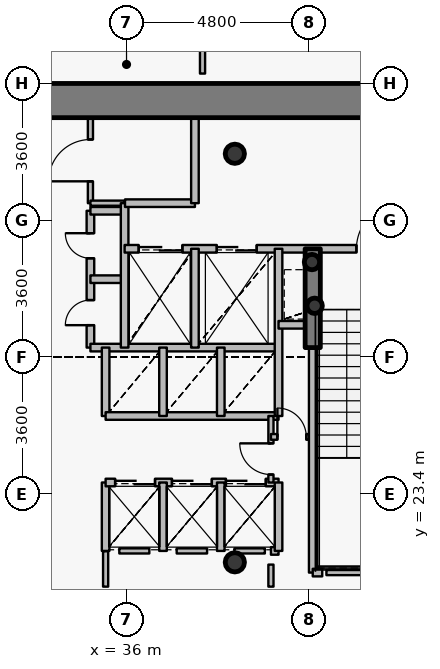
"""IFC4 building model, lengths in metres.
Left out: names, types, materials, properties, quantities, classifications, styles, units other than length and angle.
Written with IfcOpenShell. Run it as: python <this file> out.ifc"""

import sys

from ifc_helpers import new_model, si_unit, direction, frame, frame_2d, origin, origin_2d, place, context, subcontext, project, spatial, rectangle, hollow_circle, extrude, source, transform, mapped, element, fill, save


model = new_model("IFC4")
c1 = context("Model", 3, precision=1e-05, world=origin(), true_north=direction((0.0, 1.0)))
c2 = subcontext(c1, "Body", "Model", "MODEL_VIEW")
j1 = project(units=[si_unit("LENGTHUNIT", "METRE"), si_unit("PLANEANGLEUNIT", "RADIAN")], contexts=[c1])
p1 = place(None, origin())
s1 = spatial("IfcSite", under=j1, at=p1, CompositionType="ELEMENT")
p2 = place(p1, origin())
s2 = spatial("IfcBuilding", under=s1, at=p2, CompositionType="ELEMENT")
p3 = place(p2, frame((0.0, 0.0, 32.4)))
s3 = spatial("IfcBuildingStorey", under=s2, at=p3, CompositionType="ELEMENT", Elevation=32.4)
for number, where, z_axis, x_axis in (
    (1, (38.85, 21.6, 0.0), (0.0, 0.0, 1.0), (1.0, 0.0, 0.0)),
    (2, (38.85, 32.35, 0.0), (0.0, 0.0, 1.0), (1.0, 0.0, 0.0)),
):
    element("IfcColumn", number, at=place(p3, frame(where, z_axis=z_axis, x_axis=x_axis)), inside=s3, PredefinedType="COLUMN", context=c2, shape_type="SweptSolid", body=[
        extrude(hollow_circle(Radius=0.254, WallThickness=0.02, at=origin_2d()), origin(), (0.0, 0.0, 1.0), 4.2),
    ])
for number, where, z_axis, x_axis in (
    (3, (40.95, 28.35, 0.0), (0.0, 0.0, 1.0), (1.0, 0.0, 0.0)),
    (4, (40.88, 29.5, 0.0), (0.0, 0.0, 1.0), (1.0, 0.0, 0.0)),
):
    element("IfcColumn", number, at=place(p3, frame(where, z_axis=z_axis, x_axis=x_axis)), inside=s3, PredefinedType="COLUMN", context=c2, shape_type="SweptSolid", body=[
        extrude(hollow_circle(Radius=0.203, WallThickness=0.016, at=origin_2d()), origin(), (0.0, 0.0, 1.0), 4.2),
    ])
p4 = place(p3, frame((26.75, 33.75, 0.0), z_axis=(0.0, 0.0, 1.0), x_axis=(1.0, 0.0, 0.0)))
e5 = element("IfcWall", 5, at=p4, inside=s3, PredefinedType="SHEAR", context=c2, shape_type="SweptSolid", body=[
    extrude(rectangle(XDim=18.5, YDim=0.9, at=frame_2d((9.25, 0.0))), origin(), (0.0, 0.0, 1.0), 3.4),
])
p5 = place(p3, frame((40.9, 27.25, 0.0), z_axis=(0.0, 0.0, 1.0), x_axis=(0.0, 1.0, 0.0)))
e6 = element("IfcWall", 6, at=p5, inside=s3, PredefinedType="SHEAR", context=c2, shape_type="SweptSolid", body=[
    extrude(rectangle(XDim=2.6, YDim=0.4, at=frame_2d((1.3, 0.0))), origin(), (0.0, 0.0, 1.0), 3.55),
])
p6 = place(p3, frame((35.05, 27.25, 0.0), z_axis=(0.0, 0.0, 1.0), x_axis=(0.0, 1.0, 0.0)))
e7 = element("IfcWall", 7, at=p6, inside=s3, PredefinedType="PARTITIONING", context=c2, shape_type="SweptSolid", body=[
    extrude(rectangle(XDim=3.6, YDim=0.2, at=frame_2d((1.8, 0.0))), origin(), (0.0, 0.0, 1.0), 3.95),
])
p7 = place(p6, frame((0.59, 0.0, 0.0)))
e8 = element("IfcOpeningElement", 8, at=p7, cuts=e7, PredefinedType="OPENING", context=c2, shape_type="SweptSolid", body=[
    extrude(rectangle(XDim=0.66, YDim=2.05, at=origin_2d()), frame((0.33, 0.11, 1.025), z_axis=(0.0, -1.0, 0.0), x_axis=(1.0, 0.0, 0.0)), (0.0, 0.0, 1.0), 0.22),
])
p8 = place(p6, frame((2.35, 0.0, 0.0)))
e9 = element("IfcOpeningElement", 9, at=p8, cuts=e7, PredefinedType="OPENING", context=c2, shape_type="SweptSolid", body=[
    extrude(rectangle(XDim=0.66, YDim=2.05, at=origin_2d()), frame((0.33, 0.11, 1.025), z_axis=(0.0, -1.0, 0.0), x_axis=(1.0, 0.0, 0.0)), (0.0, 0.0, 1.0), 0.22),
])
p9 = place(p3, frame((35.05, 27.25, 0.0), z_axis=(0.0, 0.0, 1.0), x_axis=(1.0, 0.0, 0.0)))
e10 = element("IfcWall", 10, at=p9, inside=s3, PredefinedType="PARTITIONING", context=c2, shape_type="SweptSolid", body=[
    extrude(rectangle(XDim=4.95, YDim=0.2, at=frame_2d((2.475, 0.0))), origin(), (0.0, 0.0, 1.0), 3.535),
])
for number, where, z_axis, x_axis in (
    (11, (35.05, 29.05, 0.0), (0.0, 0.0, 1.0), (1.0, 0.0, 0.0)),
    (12, (35.05, 30.85, 0.0), (0.0, 0.0, 1.0), (1.0, 0.0, 0.0)),
):
    element("IfcWall", number, at=place(p3, frame(where, z_axis=z_axis, x_axis=x_axis)), inside=s3, PredefinedType="PARTITIONING", context=c2, shape_type="SweptSolid", body=[
        extrude(rectangle(XDim=0.9, YDim=0.2, at=frame_2d((0.45, 0.0))), origin(), (0.0, 0.0, 1.0), 3.95),
    ])
p10 = place(p3, frame((35.05, 31.05, 0.0), z_axis=(0.0, 0.0, 1.0), x_axis=(0.0, 1.0, 0.0)))
e13 = element("IfcWall", 13, at=p10, inside=s3, PredefinedType="PARTITIONING", context=c2, shape_type="SweptSolid", body=[
    extrude(rectangle(XDim=2.25, YDim=0.135, at=frame_2d((1.125, 0.0))), origin(), (0.0, 0.0, 1.0), 3.535),
])
p11 = place(p10, frame((0.575, 0.0, 0.0)))
e14 = element("IfcOpeningElement", 14, at=p11, cuts=e13, PredefinedType="OPENING", context=c2, shape_type="SweptSolid", body=[
    extrude(rectangle(XDim=1.1, YDim=2.15, at=origin_2d()), frame((0.55, 0.078, 1.075), z_axis=(0.0, -1.0, 0.0), x_axis=(1.0, 0.0, 0.0)), (0.0, 0.0, 1.0), 0.155),
])
p12 = place(p3, frame((35.05, 31.05, 0.0), z_axis=(0.0, 0.0, 1.0), x_axis=(1.0, 0.0, 0.0)))
e15 = element("IfcWall", 15, at=p12, inside=s3, PredefinedType="PARTITIONING", context=c2, shape_type="SweptSolid", body=[
    extrude(rectangle(XDim=0.9, YDim=0.135, at=frame_2d((0.45, 0.0))), origin(), (0.0, 0.0, 1.0), 3.95),
])
p13 = place(p3, frame((35.45, 21.9, 0.0), z_axis=(0.0, 0.0, 1.0), x_axis=(0.0, 1.0, 0.0)))
e16 = element("IfcWall", 16, at=p13, inside=s3, PredefinedType="PARTITIONING", context=c2, shape_type="SweptSolid", body=[
    extrude(rectangle(XDim=1.8, YDim=0.2, at=frame_2d((0.9, 0.0))), origin(), (0.0, 0.0, 1.0), 3.95),
])
p14 = place(p3, frame((35.45, 23.7, 0.0), z_axis=(0.0, 0.0, 1.0), x_axis=(1.0, 0.0, 0.0)))
e17 = element("IfcWall", 17, at=p14, inside=s3, PredefinedType="PARTITIONING", context=c2, shape_type="SweptSolid", body=[
    extrude(rectangle(XDim=4.55, YDim=0.2, at=frame_2d((2.275, 0.0))), origin(), (0.0, 0.0, 1.0), 3.535),
])
p15 = place(p14, frame((0.25, 0.0, 0.0)))
e18 = element("IfcOpeningElement", 18, at=p15, cuts=e17, PredefinedType="OPENING", context=c2, shape_type="SweptSolid", body=[
    extrude(rectangle(XDim=1.05, YDim=2.15, at=origin_2d()), frame((0.525, 0.11, 1.075), z_axis=(0.0, -1.0, 0.0), x_axis=(1.0, 0.0, 0.0)), (0.0, 0.0, 1.0), 0.22),
])
p16 = place(p14, frame((1.745, 0.0, 0.0)))
e19 = element("IfcOpeningElement", 19, at=p16, cuts=e17, PredefinedType="OPENING", context=c2, shape_type="SweptSolid", body=[
    extrude(rectangle(XDim=1.05, YDim=2.15, at=origin_2d()), frame((0.525, 0.11, 1.075), z_axis=(0.0, -1.0, 0.0), x_axis=(1.0, 0.0, 0.0)), (0.0, 0.0, 1.0), 0.22),
])
p17 = place(p14, frame((3.165, 0.0, 0.0)))
e20 = element("IfcOpeningElement", 20, at=p17, cuts=e17, PredefinedType="OPENING", context=c2, shape_type="SweptSolid", body=[
    extrude(rectangle(XDim=1.05, YDim=2.15, at=origin_2d()), frame((0.525, 0.11, 1.075), z_axis=(0.0, -1.0, 0.0), x_axis=(1.0, 0.0, 0.0)), (0.0, 0.0, 1.0), 0.22),
])
p18 = place(p3, frame((35.45, 25.45, 0.0), z_axis=(0.0, 0.0, 1.0), x_axis=(0.0, 1.0, 0.0)))
e21 = element("IfcWall", 21, at=p18, inside=s3, PredefinedType="PARTITIONING", context=c2, shape_type="SweptSolid", body=[
    extrude(rectangle(XDim=1.8, YDim=0.2, at=frame_2d((0.9, 0.0))), origin(), (0.0, 0.0, 1.0), 3.95),
])
p19 = place(p3, frame((35.45, 25.45, 0.0), z_axis=(0.0, 0.0, 1.0), x_axis=(1.0, 0.0, 0.0)))
e22 = element("IfcWall", 22, at=p19, inside=s3, PredefinedType="PARTITIONING", context=c2, shape_type="SweptSolid", body=[
    extrude(rectangle(XDim=4.55, YDim=0.2, at=frame_2d((2.275, 0.0))), origin(), (0.0, 0.0, 1.0), 3.535),
])
p20 = place(p3, frame((35.95, 27.25, 0.0), z_axis=(0.0, 0.0, 1.0), x_axis=(0.0, 1.0, 0.0)))
e23 = element("IfcWall", 23, at=p20, inside=s3, PredefinedType="PARTITIONING", context=c2, shape_type="SweptSolid", body=[
    extrude(rectangle(XDim=3.8, YDim=0.2, at=frame_2d((1.9, 0.0))), origin(), (0.0, 0.0, 1.0), 3.95),
])
p21 = place(p3, frame((35.95, 29.85, 0.0), z_axis=(0.0, 0.0, 1.0), x_axis=(1.0, 0.0, 0.0)))
e24 = element("IfcWall", 24, at=p21, inside=s3, PredefinedType="PARTITIONING", context=c2, shape_type="SweptSolid", body=[
    extrude(rectangle(XDim=8.49, YDim=0.2, at=frame_2d((4.245, 0.0))), origin(), (0.0, 0.0, 1.0), 3.535),
])
p22 = place(p21, frame((6.1, 0.0, 0.0)))
e25 = element("IfcOpeningElement", 25, at=p22, cuts=e24, PredefinedType="OPENING", context=c2, shape_type="SweptSolid", body=[
    extrude(rectangle(XDim=1.2, YDim=2.15, at=origin_2d()), frame((0.6, 0.11, 1.075), z_axis=(0.0, -1.0, 0.0), x_axis=(1.0, 0.0, 0.0)), (0.0, 0.0, 1.0), 0.22),
])
p23 = place(p21, frame((0.37, 0.0, 0.0)))
e26 = element("IfcOpeningElement", 26, at=p23, cuts=e24, PredefinedType="OPENING", context=c2, shape_type="SweptSolid", body=[
    extrude(rectangle(XDim=1.15, YDim=2.15, at=origin_2d()), frame((0.575, 0.11, 1.075), z_axis=(0.0, -1.0, 0.0), x_axis=(1.0, 0.0, 0.0)), (0.0, 0.0, 1.0), 0.22),
])
p24 = place(p21, frame((2.425, 0.0, 0.0)))
e27 = element("IfcOpeningElement", 27, at=p24, cuts=e24, PredefinedType="OPENING", context=c2, shape_type="SweptSolid", body=[
    extrude(rectangle(XDim=1.05, YDim=2.15, at=origin_2d()), frame((0.525, 0.11, 1.075), z_axis=(0.0, -1.0, 0.0), x_axis=(1.0, 0.0, 0.0)), (0.0, 0.0, 1.0), 0.22),
])
p25 = place(p3, frame((35.96, 31.05, 0.0), z_axis=(0.0, 0.0, 1.0), x_axis=(1.0, 0.0, 0.0)))
e28 = element("IfcWall", 28, at=p25, inside=s3, PredefinedType="PARTITIONING", context=c2, shape_type="SweptSolid", body=[
    extrude(rectangle(XDim=1.84, YDim=0.2, at=frame_2d((0.92, 0.0))), origin(), (0.0, 0.0, 1.0), 3.95),
])
for number, where, z_axis, x_axis in (
    (29, (36.96, 21.9, 0.0), (0.0, 0.0, 1.0), (0.0, 1.0, 0.0)),
    (30, (36.96, 25.45, 0.0), (0.0, 0.0, 1.0), (0.0, 1.0, 0.0)),
):
    element("IfcWall", number, at=place(p3, frame(where, z_axis=z_axis, x_axis=x_axis)), inside=s3, PredefinedType="PARTITIONING", context=c2, shape_type="SweptSolid", body=[
        extrude(rectangle(XDim=1.8, YDim=0.2, at=frame_2d((0.9, 0.0))), origin(), (0.0, 0.0, 1.0), 3.95),
    ])
p26 = place(p3, frame((37.8, 27.25, 0.0), z_axis=(0.0, 0.0, 1.0), x_axis=(0.0, 1.0, 0.0)))
e31 = element("IfcWall", 31, at=p26, inside=s3, PredefinedType="PARTITIONING", context=c2, shape_type="SweptSolid", body=[
    extrude(rectangle(XDim=2.6, YDim=0.2, at=frame_2d((1.3, 0.0))), origin(), (0.0, 0.0, 1.0), 3.95),
])
p27 = place(p3, frame((37.8, 31.05, 0.0), z_axis=(0.0, 0.0, 1.0), x_axis=(0.0, 1.0, 0.0)))
e32 = element("IfcWall", 32, at=p27, inside=s3, PredefinedType="PARTITIONING", context=c2, shape_type="SweptSolid", body=[
    extrude(rectangle(XDim=2.25, YDim=0.2, at=frame_2d((1.125, 0.0))), origin(), (0.0, 0.0, 1.0), 3.535),
])
for number, where, z_axis, x_axis in (
    (33, (38.48, 21.9, 0.0), (0.0, 0.0, 1.0), (0.0, 1.0, 0.0)),
    (34, (38.48, 25.45, 0.0), (0.0, 0.0, 1.0), (0.0, 1.0, 0.0)),
):
    element("IfcWall", number, at=place(p3, frame(where, z_axis=z_axis, x_axis=x_axis)), inside=s3, PredefinedType="PARTITIONING", context=c2, shape_type="SweptSolid", body=[
        extrude(rectangle(XDim=1.8, YDim=0.2, at=frame_2d((0.9, 0.0))), origin(), (0.0, 0.0, 1.0), 3.95),
    ])
p28 = place(p3, frame((39.8, 21.9, 0.0), z_axis=(0.0, 0.0, 1.0), x_axis=(1.0, 0.0, 0.0)))
e35 = element("IfcWall", 35, at=p28, inside=s3, PredefinedType="PARTITIONING", context=c2, shape_type="SweptSolid", body=[
    extrude(rectangle(XDim=0.2, YDim=0.2, at=frame_2d((0.1, 0.0))), origin(), (0.0, 0.0, 1.0), 3.95),
])
p29 = place(p3, frame((39.8, 23.7, 0.0), z_axis=(0.0, 0.0, 1.0), x_axis=(0.0, 1.0, 0.0)))
e36 = element("IfcWall", 36, at=p29, inside=s3, PredefinedType="PARTITIONING", context=c2, shape_type="SweptSolid", body=[
    extrude(rectangle(XDim=1.75, YDim=0.135, at=frame_2d((0.875, 0.0))), origin(), (0.0, 0.0, 1.0), 3.95),
])
p30 = place(p29, frame((0.21, 0.0, 0.0)))
e37 = element("IfcOpeningElement", 37, at=p30, cuts=e36, PredefinedType="OPENING", context=c2, shape_type="SweptSolid", body=[
    extrude(rectangle(XDim=0.82, YDim=2.1, at=origin_2d()), frame((0.41, 0.078, 1.05), z_axis=(0.0, -1.0, 0.0), x_axis=(1.0, 0.0, 0.0)), (0.0, 0.0, 1.0), 0.155),
])
p31 = place(p3, frame((39.8, 24.9, 0.0), z_axis=(0.0, 0.0, 1.0), x_axis=(1.0, 0.0, 0.0)))
e38 = element("IfcWall", 38, at=p31, inside=s3, PredefinedType="PARTITIONING", context=c2, shape_type="SweptSolid", body=[
    extrude(rectangle(XDim=1.1, YDim=0.15, at=frame_2d((0.55, 0.0))), origin(), (0.0, 0.0, 1.0), 3.95),
])
p32 = place(p31, frame((0.17, 0.0, 0.0)))
e39 = element("IfcOpeningElement", 39, at=p32, cuts=e38, PredefinedType="OPENING", context=c2, shape_type="SweptSolid", body=[
    extrude(rectangle(XDim=0.76, YDim=2.1, at=origin_2d()), frame((0.38, 0.085, 1.05), z_axis=(0.0, -1.0, 0.0), x_axis=(1.0, 0.0, 0.0)), (0.0, 0.0, 1.0), 0.17),
])
p33 = place(p3, frame((40.0, 21.9, 0.0), z_axis=(0.0, 0.0, 1.0), x_axis=(0.0, 1.0, 0.0)))
e40 = element("IfcWall", 40, at=p33, inside=s3, PredefinedType="PARTITIONING", context=c2, shape_type="SweptSolid", body=[
    extrude(rectangle(XDim=1.8, YDim=0.2, at=frame_2d((0.9, 0.0))), origin(), (0.0, 0.0, 1.0), 3.95),
])
p34 = place(p3, frame((40.0, 25.45, 0.0), z_axis=(0.0, 0.0, 1.0), x_axis=(0.0, 1.0, 0.0)))
e41 = element("IfcWall", 41, at=p34, inside=s3, PredefinedType="PARTITIONING", context=c2, shape_type="SweptSolid", body=[
    extrude(rectangle(XDim=4.4, YDim=0.2, at=frame_2d((2.2, 0.0))), origin(), (0.0, 0.0, 1.0), 3.95),
])
p35 = place(p3, frame((40.0, 27.85, 0.0), z_axis=(0.0, 0.0, 1.0), x_axis=(1.0, 0.0, 0.0)))
e42 = element("IfcWall", 42, at=p35, inside=s3, PredefinedType="PARTITIONING", context=c2, shape_type="SweptSolid", body=[
    extrude(rectangle(XDim=0.9, YDim=0.2, at=frame_2d((0.45, 0.0))), origin(), (0.0, 0.0, 1.0), 3.95),
])
p36 = place(p3, frame((40.9, 21.33, 0.0), z_axis=(0.0, 0.0, 1.0), x_axis=(0.0, 1.0, 0.0)))
e43 = element("IfcWall", 43, at=p36, inside=s3, PredefinedType="PARTITIONING", context=c2, shape_type="SweptSolid", body=[
    extrude(rectangle(XDim=5.91, YDim=0.2, at=frame_2d((2.955, 0.0))), origin(), (0.0, 0.0, 1.0), 3.485),
])
p37 = place(p3, frame((40.9, 21.33, 0.0), z_axis=(0.0, 0.0, 1.0), x_axis=(1.0, 0.0, 0.0)))
e44 = element("IfcWall", 44, at=p37, inside=s3, PredefinedType="PARTITIONING", context=c2, shape_type="SweptSolid", body=[
    extrude(rectangle(XDim=0.25, YDim=0.2, at=frame_2d((0.125, 0.0))), origin(), (0.0, 0.0, 1.0), 3.485),
])
p38 = place(p3, frame((44.08, 21.33, 0.0), z_axis=(0.0, 0.0, 1.0), x_axis=(-1.0, 0.0, 0.0)))
e45 = element("IfcWall", 45, at=p38, inside=s3, PredefinedType="PARTITIONING", context=c2, shape_type="SweptSolid", body=[
    extrude(rectangle(XDim=2.82, YDim=0.135, at=frame_2d((1.41, 0.0))), origin(), (0.0, 0.0, 1.0), 3.485),
])
p39 = place(p3, frame((36.6, 21.9, 0.0), z_axis=(0.0, 0.0, 1.0), x_axis=(-1.0, 0.0, 0.0)))
e46 = element("IfcWall", 46, at=p39, inside=s3, PredefinedType="PARTITIONING", context=c2, shape_type="SweptSolid", body=[
    extrude(rectangle(XDim=0.79, YDim=0.135, at=frame_2d((0.395, 0.0))), origin(), (0.0, 0.0, 1.0), 3.95),
])
p40 = place(p3, frame((38.12, 21.9, 0.0), z_axis=(0.0, 0.0, 1.0), x_axis=(-1.0, 0.0, 0.0)))
e47 = element("IfcWall", 47, at=p40, inside=s3, PredefinedType="PARTITIONING", context=c2, shape_type="SweptSolid", body=[
    extrude(rectangle(XDim=0.8, YDim=0.135, at=frame_2d((0.4, 0.0))), origin(), (0.0, 0.0, 1.0), 3.95),
])
p41 = place(p3, frame((39.64, 21.9, 0.0), z_axis=(0.0, 0.0, 1.0), x_axis=(-1.0, 0.0, 0.0)))
e48 = element("IfcWall", 48, at=p41, inside=s3, PredefinedType="PARTITIONING", context=c2, shape_type="SweptSolid", body=[
    extrude(rectangle(XDim=0.8, YDim=0.135, at=frame_2d((0.4, 0.0))), origin(), (0.0, 0.0, 1.0), 3.535),
])
p42 = place(p3, frame((39.8, 20.96, 0.0), z_axis=(0.0, 0.0, 1.0), x_axis=(0.0, 1.0, 0.0)))
e49 = element("IfcWall", 49, at=p42, inside=s3, PredefinedType="PARTITIONING", context=c2, shape_type="SweptSolid", body=[
    extrude(rectangle(XDim=0.58, YDim=0.135, at=frame_2d((0.29, 0.0))), origin(), (0.0, 0.0, 1.0), 3.485),
])
p43 = place(p3, frame((35.45, 21.89, 0.0), z_axis=(0.0, 0.0, 1.0), x_axis=(0.0, -1.0, 0.0)))
e50 = element("IfcWall", 50, at=p43, inside=s3, PredefinedType="PARTITIONING", context=c2, shape_type="SweptSolid", body=[
    extrude(rectangle(XDim=0.93, YDim=0.135, at=frame_2d((0.465, 0.0))), origin(), (0.0, 0.0, 1.0), 3.535),
])
p44 = place(p3, frame((38.0, 34.46, 0.0), z_axis=(0.0, 0.0, 1.0), x_axis=(0.0, 1.0, 0.0)))
e51 = element("IfcWall", 51, at=p44, inside=s3, PredefinedType="PARTITIONING", context=c2, shape_type="SweptSolid", body=[
    extrude(rectangle(XDim=1.64, YDim=0.135, at=frame_2d((0.82, 0.0))), origin(), (0.0, 0.0, 1.0), 3.95),
])
m1 = source(origin(), c2, "Body", "SweptSolid", [
    extrude(rectangle(XDim=1.2, YDim=2.15, at=origin_2d()), frame((0.6, 0.025, 1.075), z_axis=(0.0, -1.0, 0.0), x_axis=(1.0, 0.0, 0.0)), (0.0, 0.0, 1.0), 0.05),
])
p45 = place(p22, origin())
e52 = element("IfcDoor", 52, at=p45, inside=s3, OperationType="SINGLE_SWING_RIGHT", PredefinedType="DOOR", context=c2, shape_type="MappedRepresentation", body=[
    mapped(m1, transform((0.0, 0.0, 0.0), x_axis=(1.0, 0.0, 0.0), y_axis=(0.0, 1.0, 0.0), z_axis=(0.0, 0.0, 1.0), scale=1.0)),
])
fill(e25, e52)
m2 = source(origin(), c2, "Body", "SweptSolid", [
    extrude(rectangle(XDim=1.15, YDim=2.15, at=origin_2d()), frame((0.575, 0.025, 1.075), z_axis=(0.0, -1.0, 0.0), x_axis=(1.0, 0.0, 0.0)), (0.0, 0.0, 1.0), 0.05),
])
p46 = place(p23, origin())
e53 = element("IfcDoor", 53, at=p46, inside=s3, OperationType="DOUBLE_DOOR_SLIDING", PredefinedType="USERDEFINED", context=c2, shape_type="MappedRepresentation", body=[
    mapped(m2, transform((0.0, 0.0, 0.0), x_axis=(1.0, 0.0, 0.0), y_axis=(0.0, 1.0, 0.0), z_axis=(0.0, 0.0, 1.0), scale=1.0)),
])
fill(e26, e53)
m3 = source(origin(), c2, "Body", "SweptSolid", [
    extrude(rectangle(XDim=1.05, YDim=2.15, at=origin_2d()), frame((0.525, 0.025, 1.075), z_axis=(0.0, -1.0, 0.0), x_axis=(1.0, 0.0, 0.0)), (0.0, 0.0, 1.0), 0.05),
])
p47 = place(p24, origin())
e54 = element("IfcDoor", 54, at=p47, inside=s3, OperationType="DOUBLE_DOOR_SLIDING", PredefinedType="USERDEFINED", context=c2, shape_type="MappedRepresentation", body=[
    mapped(m3, transform((0.0, 0.0, 0.0), x_axis=(1.0, 0.0, 0.0), y_axis=(0.0, 1.0, 0.0), z_axis=(0.0, 0.0, 1.0), scale=1.0)),
])
fill(e27, e54)
p48 = place(p15, origin())
e55 = element("IfcDoor", 55, at=p48, inside=s3, OperationType="DOUBLE_DOOR_SLIDING", PredefinedType="USERDEFINED", context=c2, shape_type="MappedRepresentation", body=[
    mapped(m3, transform((0.0, 0.0, 0.0), x_axis=(1.0, 0.0, 0.0), y_axis=(0.0, 1.0, 0.0), z_axis=(0.0, 0.0, 1.0), scale=1.0)),
])
fill(e18, e55)
p49 = place(p16, origin())
e56 = element("IfcDoor", 56, at=p49, inside=s3, OperationType="DOUBLE_DOOR_SLIDING", PredefinedType="USERDEFINED", context=c2, shape_type="MappedRepresentation", body=[
    mapped(m3, transform((0.0, 0.0, 0.0), x_axis=(1.0, 0.0, 0.0), y_axis=(0.0, 1.0, 0.0), z_axis=(0.0, 0.0, 1.0), scale=1.0)),
])
fill(e19, e56)
p50 = place(p17, origin())
e57 = element("IfcDoor", 57, at=p50, inside=s3, OperationType="DOUBLE_DOOR_SLIDING", PredefinedType="USERDEFINED", context=c2, shape_type="MappedRepresentation", body=[
    mapped(m3, transform((0.0, 0.0, 0.0), x_axis=(1.0, 0.0, 0.0), y_axis=(0.0, 1.0, 0.0), z_axis=(0.0, 0.0, 1.0), scale=1.0)),
])
fill(e20, e57)
m4 = source(origin(), c2, "Body", "SweptSolid", [
    extrude(rectangle(XDim=0.66, YDim=2.05, at=origin_2d()), frame((0.33, 0.025, 1.025), z_axis=(0.0, -1.0, 0.0), x_axis=(1.0, 0.0, 0.0)), (0.0, 0.0, 1.0), 0.05),
])
p51 = place(p7, origin())
e58 = element("IfcDoor", 58, at=p51, inside=s3, OperationType="SINGLE_SWING_LEFT", PredefinedType="USERDEFINED", context=c2, shape_type="MappedRepresentation", body=[
    mapped(m4, transform((0.0, 0.0, 0.0), x_axis=(1.0, 0.0, 0.0), y_axis=(0.0, 1.0, 0.0), z_axis=(0.0, 0.0, 1.0), scale=1.0)),
])
fill(e8, e58)
p52 = place(p8, origin())
e59 = element("IfcDoor", 59, at=p52, inside=s3, OperationType="SINGLE_SWING_RIGHT", PredefinedType="USERDEFINED", context=c2, shape_type="MappedRepresentation", body=[
    mapped(m4, transform((0.0, 0.0, 0.0), x_axis=(1.0, 0.0, 0.0), y_axis=(0.0, 1.0, 0.0), z_axis=(0.0, 0.0, 1.0), scale=1.0)),
])
fill(e9, e59)
m5 = source(origin(), c2, "Body", "SweptSolid", [
    extrude(rectangle(XDim=1.1, YDim=2.15, at=origin_2d()), frame((0.55, 0.025, 1.075), z_axis=(0.0, -1.0, 0.0), x_axis=(1.0, 0.0, 0.0)), (0.0, 0.0, 1.0), 0.05),
])
p53 = place(p11, origin())
e60 = element("IfcDoor", 60, at=p53, inside=s3, OperationType="SINGLE_SWING_LEFT", PredefinedType="DOOR", context=c2, shape_type="MappedRepresentation", body=[
    mapped(m5, transform((0.0, 0.0, 0.0), x_axis=(1.0, 0.0, 0.0), y_axis=(0.0, 1.0, 0.0), z_axis=(0.0, 0.0, 1.0), scale=1.0)),
])
fill(e14, e60)
m6 = source(origin(), c2, "Body", "SweptSolid", [
    extrude(rectangle(XDim=0.82, YDim=2.1, at=origin_2d()), frame((0.41, 0.025, 1.05), z_axis=(0.0, -1.0, 0.0), x_axis=(1.0, 0.0, 0.0)), (0.0, 0.0, 1.0), 0.05),
])
p54 = place(p30, origin())
e61 = element("IfcDoor", 61, at=p54, inside=s3, OperationType="SINGLE_SWING_RIGHT", PredefinedType="DOOR", context=c2, shape_type="MappedRepresentation", body=[
    mapped(m6, transform((0.0, 0.0, 0.0), x_axis=(1.0, 0.0, 0.0), y_axis=(0.0, 1.0, 0.0), z_axis=(0.0, 0.0, 1.0), scale=1.0)),
])
fill(e37, e61)
m7 = source(origin(), c2, "Body", "SweptSolid", [
    extrude(rectangle(XDim=0.76, YDim=2.1, at=origin_2d()), frame((0.38, 0.025, 1.05), z_axis=(0.0, -1.0, 0.0), x_axis=(1.0, 0.0, 0.0)), (0.0, 0.0, 1.0), 0.05),
])
p55 = place(p32, origin())
e62 = element("IfcDoor", 62, at=p55, inside=s3, OperationType="SINGLE_SWING_LEFT", PredefinedType="DOOR", context=c2, shape_type="MappedRepresentation", body=[
    mapped(m7, transform((0.0, 0.0, 0.0), x_axis=(1.0, 0.0, 0.0), y_axis=(0.0, 1.0, 0.0), z_axis=(0.0, 0.0, 1.0), scale=1.0)),
])
fill(e39, e62)
save(model, sys.argv[1])
